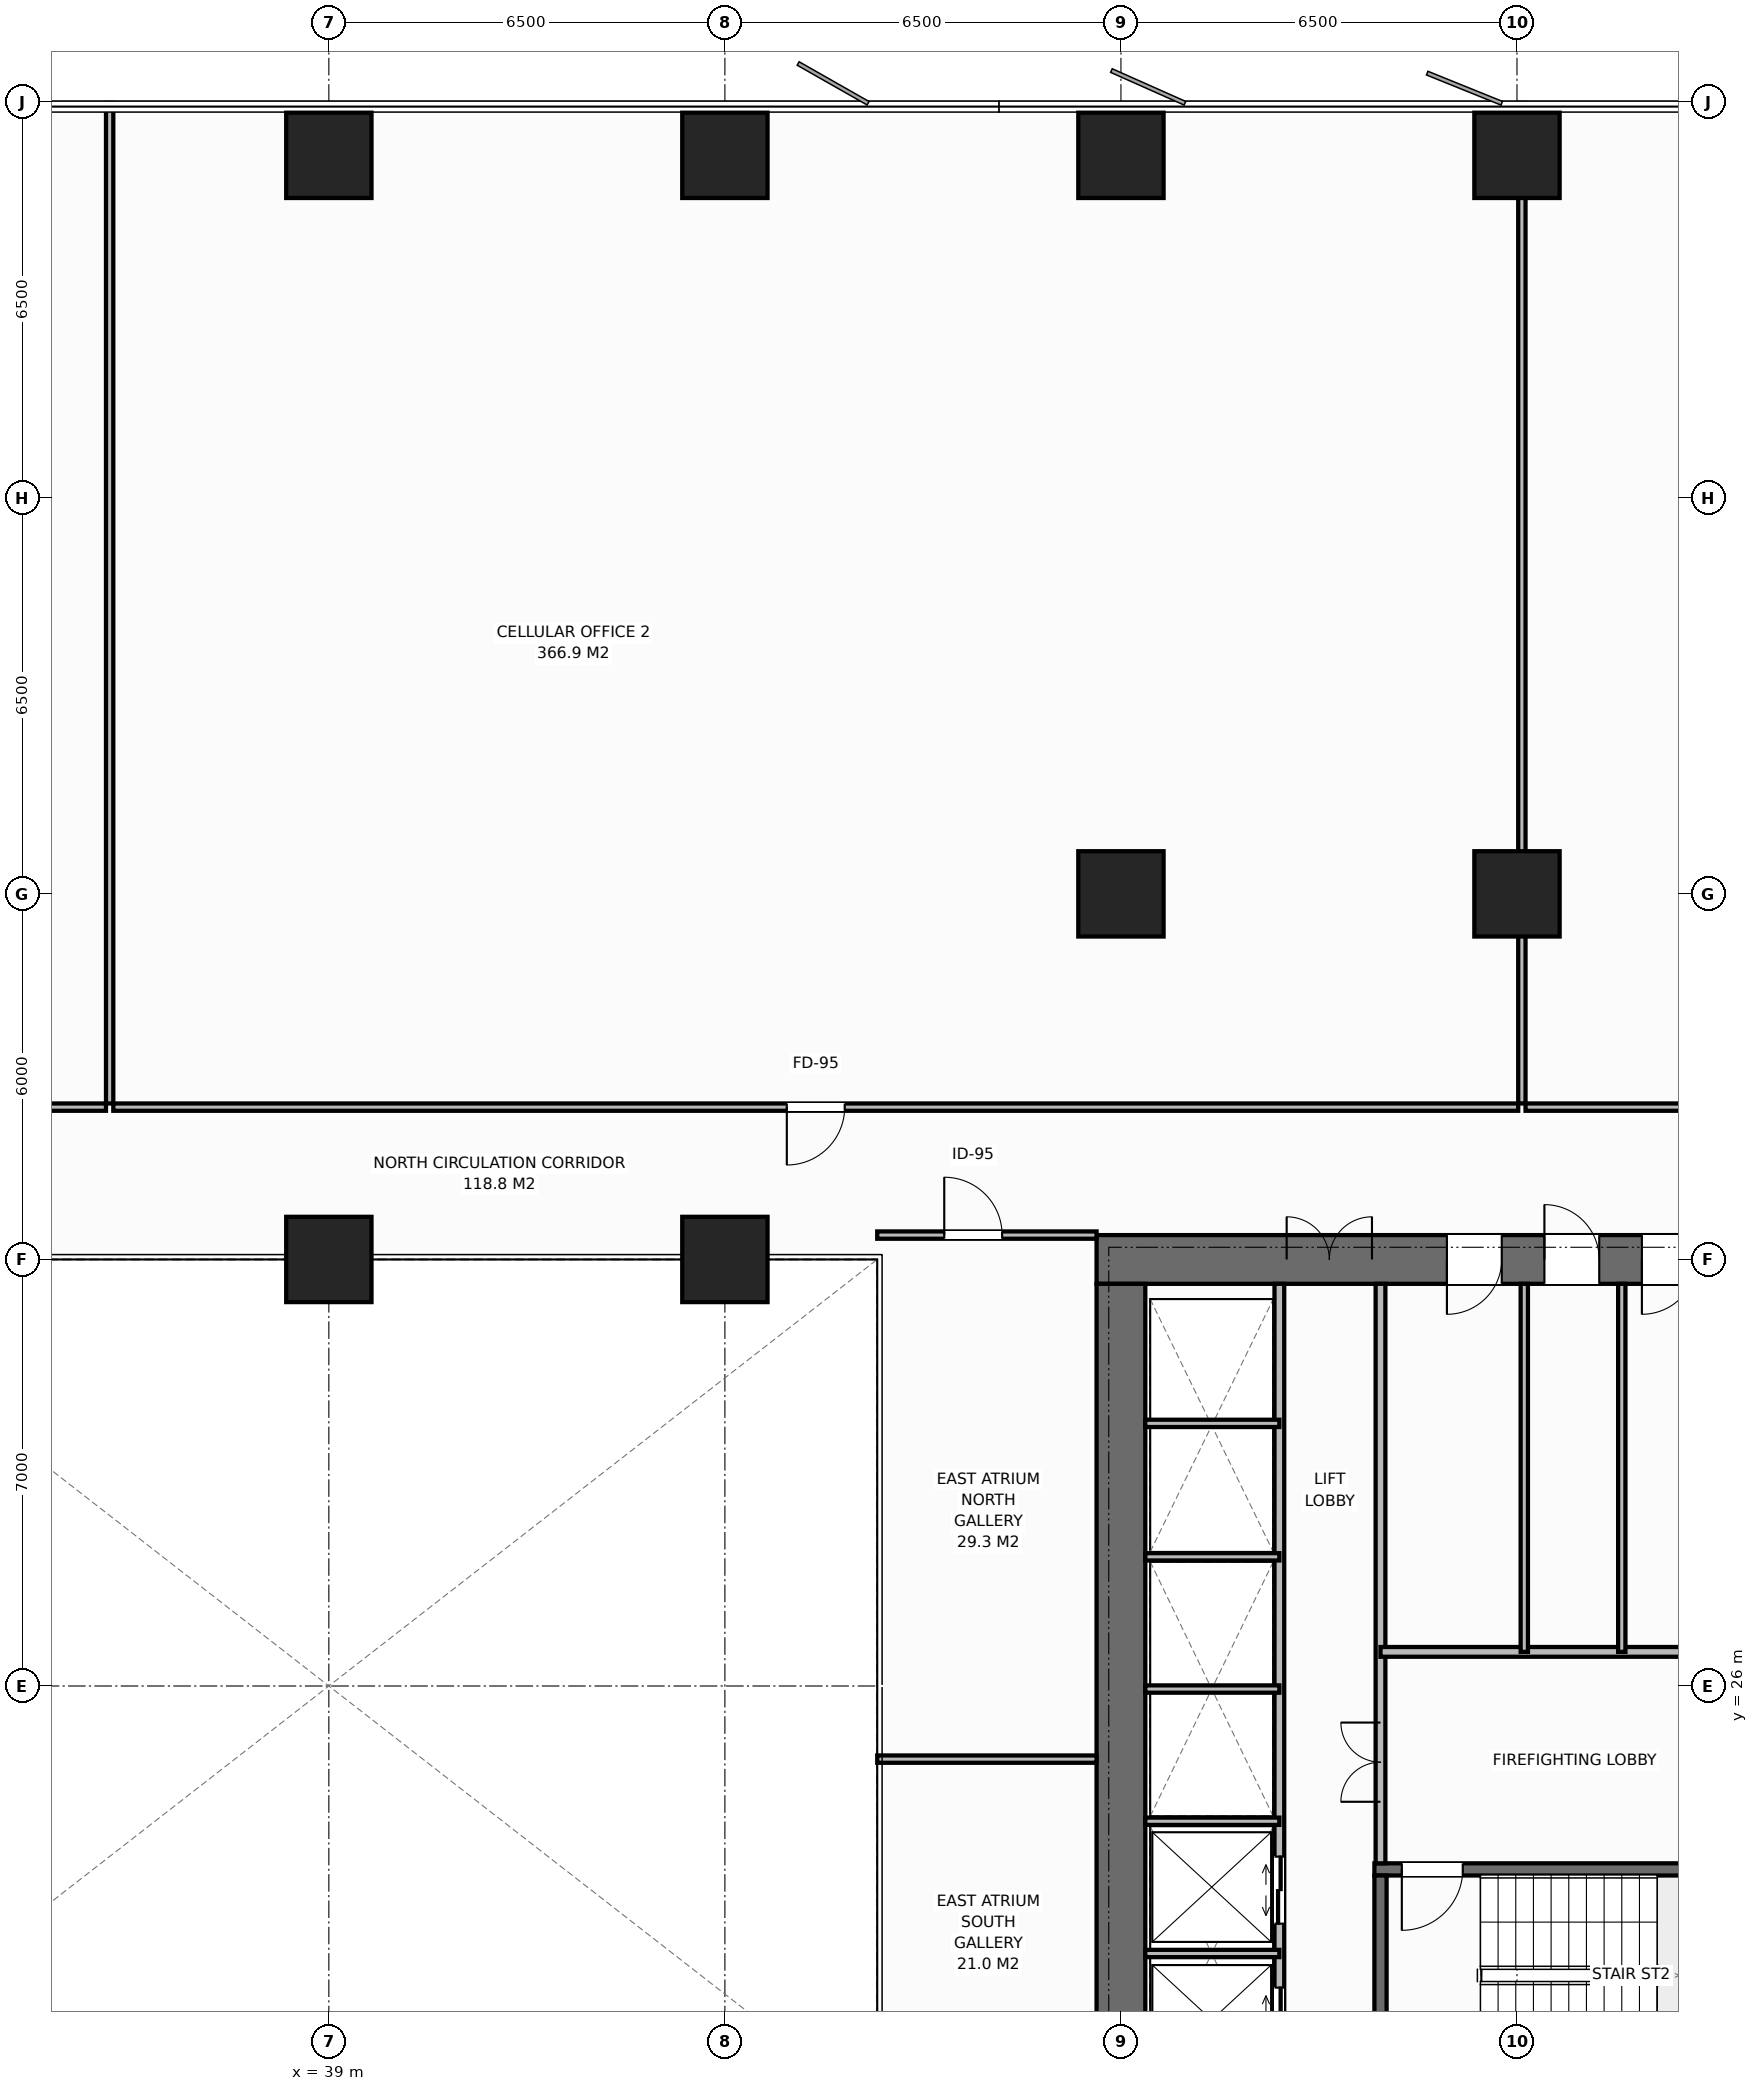
"""IFC4 building model, lengths in metres.
Left out: names, types, materials, properties, quantities, classifications, styles, units other than length and angle.
Written with IfcOpenShell. Run it as: python <this file> out.ifc"""

import sys

from ifc_helpers import new_model, si_unit, direction, frame, frame_2d, origin, origin_2d, place, context, subcontext, project, spatial, rectangle, extrude, element, fill, save


model = new_model("IFC4")
c1 = context("Model", 3, precision=1e-05, world=origin(), true_north=direction((0.0, 1.0)))
c2 = subcontext(c1, "Body", "Model", "MODEL_VIEW")
j1 = project(units=[si_unit("LENGTHUNIT", "METRE"), si_unit("PLANEANGLEUNIT", "RADIAN")], contexts=[c1])
p1 = place(None, origin())
s1 = spatial("IfcSite", under=j1, at=p1, CompositionType="ELEMENT")
p2 = place(p1, origin())
s2 = spatial("IfcBuilding", under=s1, at=p2, CompositionType="ELEMENT")
p3 = place(p2, frame((0.0, 0.0, 43.0)))
s3 = spatial("IfcBuildingStorey", under=s2, at=p3, CompositionType="ELEMENT", Elevation=43.0)
p4 = place(p3, frame((51.6, 33.0, 0.0), z_axis=(0.0, 0.0, 1.0), x_axis=(1.0, 0.0, 0.0)))
e1 = element("IfcWall", 1, at=p4, inside=s3, PredefinedType="SHEAR", context=c2, shape_type="SweptSolid", body=[
    extrude(rectangle(XDim=13.8, YDim=0.8, at=frame_2d((6.9, 0.0))), origin(), (0.0, 0.0, 1.0), 3.8),
])
p5 = place(p4, frame((3.12, 0.0, 0.0)))
e2 = element("IfcOpeningElement", 2, at=p5, cuts=e1, PredefinedType="OPENING", context=c2, shape_type="SweptSolid", body=[
    extrude(rectangle(XDim=1.4, YDim=2.2, at=frame_2d((0.7, 1.1))), frame((0.0, 0.41, 0.0), z_axis=(0.0, -1.0, 0.0), x_axis=(1.0, 0.0, 0.0)), (0.0, 0.0, 1.0), 0.82),
])
p6 = place(p4, frame((11.0, 0.0, 0.0)))
e3 = element("IfcOpeningElement", 3, at=p6, cuts=e1, PredefinedType="OPENING", context=c2, shape_type="SweptSolid", body=[
    extrude(rectangle(XDim=0.9, YDim=2.15, at=frame_2d((0.45, 1.075))), frame((0.0, 0.41, 0.0), z_axis=(0.0, -1.0, 0.0), x_axis=(1.0, 0.0, 0.0)), (0.0, 0.0, 1.0), 0.82),
])
p7 = place(p4, frame((5.75, 0.0, 0.0)))
e4 = element("IfcOpeningElement", 4, at=p7, cuts=e1, PredefinedType="OPENING", context=c2, shape_type="SweptSolid", body=[
    extrude(rectangle(XDim=0.9, YDim=2.15, at=frame_2d((0.45, 1.075))), frame((0.0, 0.41, 0.0), z_axis=(0.0, -1.0, 0.0), x_axis=(1.0, 0.0, 0.0)), (0.0, 0.0, 1.0), 0.82),
])
p8 = place(p4, frame((7.35, 0.0, 0.0)))
e5 = element("IfcOpeningElement", 5, at=p8, cuts=e1, PredefinedType="OPENING", context=c2, shape_type="SweptSolid", body=[
    extrude(rectangle(XDim=0.9, YDim=2.15, at=frame_2d((0.45, 1.075))), frame((0.0, 0.41, 0.0), z_axis=(0.0, -1.0, 0.0), x_axis=(1.0, 0.0, 0.0)), (0.0, 0.0, 1.0), 0.82),
])
p9 = place(p4, frame((8.95, 0.0, 0.0)))
e6 = element("IfcOpeningElement", 6, at=p9, cuts=e1, PredefinedType="OPENING", context=c2, shape_type="SweptSolid", body=[
    extrude(rectangle(XDim=0.9, YDim=2.15, at=frame_2d((0.45, 1.075))), frame((0.0, 0.41, 0.0), z_axis=(0.0, -1.0, 0.0), x_axis=(1.0, 0.0, 0.0)), (0.0, 0.0, 1.0), 0.82),
])
p10 = place(p3, frame((52.0, 19.4, 0.0), z_axis=(0.0, 0.0, 1.0), x_axis=(0.0, 1.0, 0.0)))
e7 = element("IfcWall", 7, at=p10, inside=s3, PredefinedType="SHEAR", context=c2, shape_type="SweptSolid", body=[
    extrude(rectangle(XDim=13.2, YDim=0.8, at=frame_2d((6.6, 0.0))), origin(), (0.0, 0.0, 1.0), 3.8),
])
p11 = place(p3, frame((56.16, 22.99, 0.0), z_axis=(0.0, 0.0, 1.0), x_axis=(1.0, 0.0, 0.0)))
e8 = element("IfcWall", 8, at=p11, inside=s3, PredefinedType="SHEAR", context=c2, shape_type="SweptSolid", body=[
    extrude(rectangle(XDim=8.43, YDim=0.2, at=frame_2d((4.215, 0.0))), origin(), (0.0, 0.0, 1.0), 3.8),
])
p12 = place(p11, frame((0.45, 0.0, 0.0)))
e9 = element("IfcOpeningElement", 9, at=p12, cuts=e8, PredefinedType="OPENING", context=c2, shape_type="SweptSolid", body=[
    extrude(rectangle(XDim=1.0, YDim=2.15, at=frame_2d((0.5, 1.075))), frame((0.0, 0.11, 0.0), z_axis=(0.0, -1.0, 0.0), x_axis=(1.0, 0.0, 0.0)), (0.0, 0.0, 1.0), 0.22),
])
p13 = place(p3, frame((56.26, 19.61, 0.0), z_axis=(0.0, 0.0, 1.0), x_axis=(0.0, 1.0, 0.0)))
e10 = element("IfcWall", 10, at=p13, inside=s3, PredefinedType="SHEAR", context=c2, shape_type="SweptSolid", body=[
    extrude(rectangle(XDim=3.28, YDim=0.2, at=frame_2d((1.64, 0.0))), origin(), (0.0, 0.0, 1.0), 3.8),
])
for number, where, z_axis, x_axis in (
    (11, (58.5, 39.0, 0.0), (0.0, 0.0, 1.0), (1.0, 0.0, 0.0)),
    (12, (39.0, 33.0, 0.0), (0.0, 0.0, 1.0), (1.0, 0.0, 0.0)),
    (13, (45.5, 33.0, 0.0), (0.0, 0.0, 1.0), (1.0, 0.0, 0.0)),
    (14, (52.0, 39.0, 0.0), (0.0, 0.0, 1.0), (1.0, 0.0, 0.0)),
    (15, (39.0, 51.12, 0.0), (0.0, 0.0, 1.0), (1.0, 0.0, 0.0)),
    (16, (45.5, 51.12, 0.0), (0.0, 0.0, 1.0), (1.0, 0.0, 0.0)),
    (17, (52.0, 51.12, 0.0), (0.0, 0.0, 1.0), (1.0, 0.0, 0.0)),
    (18, (58.5, 51.12, 0.0), (0.0, 0.0, 1.0), (1.0, 0.0, 0.0)),
):
    element("IfcColumn", number, at=place(p3, frame(where, z_axis=z_axis, x_axis=x_axis)), inside=s3, PredefinedType="COLUMN", context=c2, shape_type="SweptSolid", body=[
        extrude(rectangle(XDim=1.4, YDim=1.4, at=origin_2d()), origin(), (0.0, 0.0, 1.0), 3.8),
    ])
p14 = place(p3, frame((54.6, 19.4, 0.0), z_axis=(0.0, 0.0, 1.0), x_axis=(0.0, 1.0, 0.0)))
e19 = element("IfcWall", 19, at=p14, inside=s3, PredefinedType="STANDARD", context=c2, shape_type="SweptSolid", body=[
    extrude(rectangle(XDim=13.2, YDim=0.16, at=frame_2d((6.6, 0.0))), origin(), (0.0, 0.0, 1.0), 3.55),
])
p15 = place(p14, frame((0.55, 0.0, 0.0)))
e20 = element("IfcOpeningElement", 20, at=p15, cuts=e19, PredefinedType="OPENING", context=c2, shape_type="SweptSolid", body=[
    extrude(rectangle(XDim=1.1, YDim=2.2, at=frame_2d((0.55, 1.1))), frame((0.0, 0.09, 0.0), z_axis=(0.0, -1.0, 0.0), x_axis=(1.0, 0.0, 0.0)), (0.0, 0.0, 1.0), 0.18),
])
p16 = place(p14, frame((2.7, 0.0, 0.0)))
e21 = element("IfcOpeningElement", 21, at=p16, cuts=e19, PredefinedType="OPENING", context=c2, shape_type="SweptSolid", body=[
    extrude(rectangle(XDim=1.1, YDim=2.2, at=frame_2d((0.55, 1.1))), frame((0.0, 0.09, 0.0), z_axis=(0.0, -1.0, 0.0), x_axis=(1.0, 0.0, 0.0)), (0.0, 0.0, 1.0), 0.18),
])
p17 = place(p3, frame((56.26, 23.09, 0.0), z_axis=(0.0, 0.0, 1.0), x_axis=(0.0, 1.0, 0.0)))
e22 = element("IfcWall", 22, at=p17, inside=s3, PredefinedType="STANDARD", context=c2, shape_type="SweptSolid", body=[
    extrude(rectangle(XDim=9.51, YDim=0.16, at=frame_2d((4.755, 0.0))), origin(), (0.0, 0.0, 1.0), 3.55),
])
p18 = place(p17, frame((1.01, 0.0, 0.0)))
e23 = element("IfcOpeningElement", 23, at=p18, cuts=e22, PredefinedType="OPENING", context=c2, shape_type="SweptSolid", body=[
    extrude(rectangle(XDim=1.3, YDim=2.2, at=frame_2d((0.65, 1.1))), frame((0.0, 0.09, 0.0), z_axis=(0.0, -1.0, 0.0), x_axis=(1.0, 0.0, 0.0)), (0.0, 0.0, 1.0), 0.18),
])
for number, where, z_axis, x_axis in (
    (24, (52.4, 21.61, 0.0), (0.0, 0.0, 1.0), (1.0, 0.0, 0.0)),
    (25, (52.4, 23.78, 0.0), (0.0, 0.0, 1.0), (1.0, 0.0, 0.0)),
    (26, (52.4, 25.95, 0.0), (0.0, 0.0, 1.0), (1.0, 0.0, 0.0)),
    (27, (52.4, 28.12, 0.0), (0.0, 0.0, 1.0), (1.0, 0.0, 0.0)),
    (28, (52.4, 30.31, 0.0), (0.0, 0.0, 1.0), (1.0, 0.0, 0.0)),
):
    element("IfcWall", number, at=place(p3, frame(where, z_axis=z_axis, x_axis=x_axis)), inside=s3, PredefinedType="PARTITIONING", context=c2, shape_type="SweptSolid", body=[
        extrude(rectangle(XDim=2.2, YDim=0.12, at=frame_2d((1.1, 0.0))), origin(), (0.0, 0.0, 1.0), 3.55),
    ])
p19 = place(p3, frame((56.26, 26.56, 0.0), z_axis=(0.0, 0.0, 1.0), x_axis=(1.0, 0.0, 0.0)))
e29 = element("IfcWall", 29, at=p19, inside=s3, PredefinedType="STANDARD", context=c2, shape_type="SweptSolid", body=[
    extrude(rectangle(XDim=8.34, YDim=0.16, at=frame_2d((4.17, 0.0))), origin(), (0.0, 0.0, 1.0), 3.55),
])
for number, where, z_axis, x_axis in (
    (30, (58.62, 26.56, 0.0), (0.0, 0.0, 1.0), (0.0, 1.0, 0.0)),
    (31, (60.22, 26.56, 0.0), (0.0, 0.0, 1.0), (0.0, 1.0, 0.0)),
):
    element("IfcWall", number, at=place(p3, frame(where, z_axis=z_axis, x_axis=x_axis)), inside=s3, PredefinedType="PARTITIONING", context=c2, shape_type="SweptSolid", body=[
        extrude(rectangle(XDim=6.04, YDim=0.12, at=frame_2d((3.02, 0.0))), origin(), (0.0, 0.0, 1.0), 3.55),
    ])
p20 = place(p3, frame((48.0, 24.8, 0.0), z_axis=(0.0, 0.0, 1.0), x_axis=(1.0, 0.0, 0.0)))
e32 = element("IfcWall", 32, at=p20, inside=s3, PredefinedType="PARTITIONING", context=c2, shape_type="SweptSolid", body=[
    extrude(rectangle(XDim=3.6, YDim=0.12, at=frame_2d((1.8, 0.0))), origin(), (0.0, 0.0, 1.0), 3.55),
])
p21 = place(p3, frame((48.0, 33.4, 0.0), z_axis=(0.0, 0.0, 1.0), x_axis=(1.0, 0.0, 0.0)))
e33 = element("IfcWall", 33, at=p21, inside=s3, PredefinedType="PARTITIONING", context=c2, shape_type="SweptSolid", body=[
    extrude(rectangle(XDim=3.6, YDim=0.12, at=frame_2d((1.8, 0.0))), origin(), (0.0, 0.0, 1.0), 3.55),
])
p22 = place(p21, frame((1.1, 0.0, 0.0)))
e34 = element("IfcOpeningElement", 34, at=p22, cuts=e33, PredefinedType="OPENING", context=c2, shape_type="SweptSolid", body=[
    extrude(rectangle(XDim=0.95, YDim=2.15, at=frame_2d((0.475, 1.075))), frame((0.0, 0.07, 0.0), z_axis=(0.0, -1.0, 0.0), x_axis=(1.0, 0.0, 0.0)), (0.0, 0.0, 1.0), 0.14),
])
p23 = place(p3, frame((35.402, 35.56, 0.0), z_axis=(0.0, 0.0, 1.0), x_axis=(0.0, 1.0, 0.0)))
e35 = element("IfcWall", 35, at=p23, inside=s3, PredefinedType="PARTITIONING", context=c2, shape_type="SweptSolid", body=[
    extrude(rectangle(XDim=16.42, YDim=0.12, at=frame_2d((8.21, 0.0))), origin(), (0.0, 0.0, 1.0), 3.55),
])
p24 = place(p3, frame((20.487, 35.5, 0.0), z_axis=(0.0, 0.0, 1.0), x_axis=(1.0, 0.0, 0.0)))
e36 = element("IfcWall", 36, at=p24, inside=s3, PredefinedType="PARTITIONING", context=c2, shape_type="SweptSolid", body=[
    extrude(rectangle(XDim=14.856, YDim=0.12, at=frame_2d((7.428, 0.0))), origin(), (0.0, 0.0, 1.0), 3.55),
])
p25 = place(p24, frame((6.953, 0.0, 0.0)))
e37 = element("IfcOpeningElement", 37, at=p25, cuts=e36, PredefinedType="OPENING", context=c2, shape_type="SweptSolid", body=[
    extrude(rectangle(XDim=0.95, YDim=2.15, at=frame_2d((0.475, 1.075))), frame((0.0, 0.07, 0.0), z_axis=(0.0, -1.0, 0.0), x_axis=(1.0, 0.0, 0.0)), (0.0, 0.0, 1.0), 0.14),
])
p26 = place(p3, frame((58.58, 35.56, 0.0), z_axis=(0.0, 0.0, 1.0), x_axis=(0.0, 1.0, 0.0)))
e38 = element("IfcWall", 38, at=p26, inside=s3, PredefinedType="PARTITIONING", context=c2, shape_type="SweptSolid", body=[
    extrude(rectangle(XDim=16.42, YDim=0.12, at=frame_2d((8.21, 0.0))), origin(), (0.0, 0.0, 1.0), 2.9),
])
p27 = place(p3, frame((35.462, 35.5, 0.0), z_axis=(0.0, 0.0, 1.0), x_axis=(1.0, 0.0, 0.0)))
e39 = element("IfcWall", 39, at=p27, inside=s3, PredefinedType="PARTITIONING", context=c2, shape_type="SweptSolid", body=[
    extrude(rectangle(XDim=23.058, YDim=0.12, at=frame_2d((11.529, 0.0))), origin(), (0.0, 0.0, 1.0), 3.55),
])
p28 = place(p27, frame((11.054, 0.0, 0.0)))
e40 = element("IfcOpeningElement", 40, at=p28, cuts=e39, PredefinedType="OPENING", context=c2, shape_type="SweptSolid", body=[
    extrude(rectangle(XDim=0.95, YDim=2.15, at=frame_2d((0.475, 1.075))), frame((0.0, 0.07, 0.0), z_axis=(0.0, -1.0, 0.0), x_axis=(1.0, 0.0, 0.0)), (0.0, 0.0, 1.0), 0.14),
])
p29 = place(p3, frame((58.64, 35.5, 0.0), z_axis=(0.0, 0.0, 1.0), x_axis=(1.0, 0.0, 0.0)))
e41 = element("IfcWall", 41, at=p29, inside=s3, PredefinedType="PARTITIONING", context=c2, shape_type="SweptSolid", body=[
    extrude(rectangle(XDim=19.38, YDim=0.12, at=frame_2d((9.69, 0.0))), origin(), (0.0, 0.0, 1.0), 3.55),
])
p30 = place(p29, frame((4.005, 0.0, 0.0)))
e42 = element("IfcOpeningElement", 42, at=p30, cuts=e41, PredefinedType="OPENING", context=c2, shape_type="SweptSolid", body=[
    extrude(rectangle(XDim=0.95, YDim=2.15, at=frame_2d((0.475, 1.075))), frame((0.0, 0.07, 0.0), z_axis=(0.0, -1.0, 0.0), x_axis=(1.0, 0.0, 0.0)), (0.0, 0.0, 1.0), 0.14),
])
p31 = place(p5, origin())
e43 = element("IfcDoor", 43, at=p31, inside=s3, OperationType="DOUBLE_DOOR_SINGLE_SWING", PredefinedType="DOOR", context=c2, shape_type="SweptSolid", body=[
    extrude(rectangle(XDim=1.4, YDim=2.2, at=frame_2d((0.7, 1.1))), frame((0.0, -0.075, 0.0), z_axis=(0.0, -1.0, 0.0), x_axis=(1.0, 0.0, 0.0)), (0.0, 0.0, 1.0), 0.05),
])
fill(e2, e43)
p32 = place(p15, origin())
e44 = element("IfcDoor", 44, at=p32, inside=s3, OperationType="DOUBLE_DOOR_SLIDING", PredefinedType="DOOR", context=c2, shape_type="SweptSolid", body=[
    extrude(rectangle(XDim=1.1, YDim=2.2, at=frame_2d((0.55, 1.1))), frame((0.0, 0.025, 0.0), z_axis=(0.0, -1.0, 0.0), x_axis=(1.0, 0.0, 0.0)), (0.0, 0.0, 1.0), 0.05),
])
fill(e20, e44)
p33 = place(p16, origin())
e45 = element("IfcDoor", 45, at=p33, inside=s3, OperationType="DOUBLE_DOOR_SLIDING", PredefinedType="DOOR", context=c2, shape_type="SweptSolid", body=[
    extrude(rectangle(XDim=1.1, YDim=2.2, at=frame_2d((0.55, 1.1))), frame((0.0, 0.025, 0.0), z_axis=(0.0, -1.0, 0.0), x_axis=(1.0, 0.0, 0.0)), (0.0, 0.0, 1.0), 0.05),
])
fill(e21, e45)
p34 = place(p12, origin())
e46 = element("IfcDoor", 46, at=p34, inside=s3, OperationType="SINGLE_SWING_RIGHT", PredefinedType="DOOR", context=c2, shape_type="SweptSolid", body=[
    extrude(rectangle(XDim=1.0, YDim=2.15, at=frame_2d((0.5, 1.075))), frame((0.0, 0.025, 0.0), z_axis=(0.0, -1.0, 0.0), x_axis=(1.0, 0.0, 0.0)), (0.0, 0.0, 1.0), 0.05),
])
fill(e9, e46)
p35 = place(p18, origin())
e47 = element("IfcDoor", 47, at=p35, inside=s3, OperationType="DOUBLE_DOOR_SINGLE_SWING", PredefinedType="DOOR", context=c2, shape_type="SweptSolid", body=[
    extrude(rectangle(XDim=1.3, YDim=2.2, at=frame_2d((0.65, 1.1))), frame((0.0, 0.025, 0.0), z_axis=(0.0, -1.0, 0.0), x_axis=(1.0, 0.0, 0.0)), (0.0, 0.0, 1.0), 0.05),
])
fill(e23, e47)
p36 = place(p7, origin())
e48 = element("IfcDoor", 48, at=p36, inside=s3, OperationType="SINGLE_SWING_RIGHT", PredefinedType="DOOR", context=c2, shape_type="SweptSolid", body=[
    extrude(rectangle(XDim=0.9, YDim=2.15, at=frame_2d((0.45, 1.075))), frame((0.0, -0.075, 0.0), z_axis=(0.0, -1.0, 0.0), x_axis=(1.0, 0.0, 0.0)), (0.0, 0.0, 1.0), 0.05),
])
fill(e4, e48)
p37 = place(p8, origin())
e49 = element("IfcDoor", 49, at=p37, inside=s3, OperationType="SINGLE_SWING_LEFT", PredefinedType="DOOR", context=c2, shape_type="SweptSolid", body=[
    extrude(rectangle(XDim=0.9, YDim=2.15, at=frame_2d((0.45, 1.075))), frame((0.0, -0.075, 0.0), z_axis=(0.0, -1.0, 0.0), x_axis=(1.0, 0.0, 0.0)), (0.0, 0.0, 1.0), 0.05),
])
fill(e5, e49)
p38 = place(p9, origin())
e50 = element("IfcDoor", 50, at=p38, inside=s3, OperationType="SINGLE_SWING_RIGHT", PredefinedType="DOOR", context=c2, shape_type="SweptSolid", body=[
    extrude(rectangle(XDim=0.9, YDim=2.15, at=frame_2d((0.45, 1.075))), frame((0.0, -0.075, 0.0), z_axis=(0.0, -1.0, 0.0), x_axis=(1.0, 0.0, 0.0)), (0.0, 0.0, 1.0), 0.05),
])
fill(e6, e50)
p39 = place(p22, origin())
e51 = element("IfcDoor", 51, at=p39, inside=s3, OperationType="SINGLE_SWING_LEFT", PredefinedType="DOOR", context=c2, shape_type="SweptSolid", body=[
    extrude(rectangle(XDim=0.95, YDim=2.15, at=frame_2d((0.475, 1.075))), frame((0.0, 0.025, 0.0), z_axis=(0.0, -1.0, 0.0), x_axis=(1.0, 0.0, 0.0)), (0.0, 0.0, 1.0), 0.05),
])
fill(e34, e51)
p40 = place(p28, origin())
e52 = element("IfcDoor", 52, at=p40, inside=s3, OperationType="SINGLE_SWING_RIGHT", PredefinedType="DOOR", context=c2, shape_type="SweptSolid", body=[
    extrude(rectangle(XDim=0.95, YDim=2.15, at=frame_2d((0.475, 1.075))), frame((0.0, 0.025, 0.0), z_axis=(0.0, -1.0, 0.0), x_axis=(1.0, 0.0, 0.0)), (0.0, 0.0, 1.0), 0.05),
])
fill(e40, e52)
save(model, sys.argv[1])
